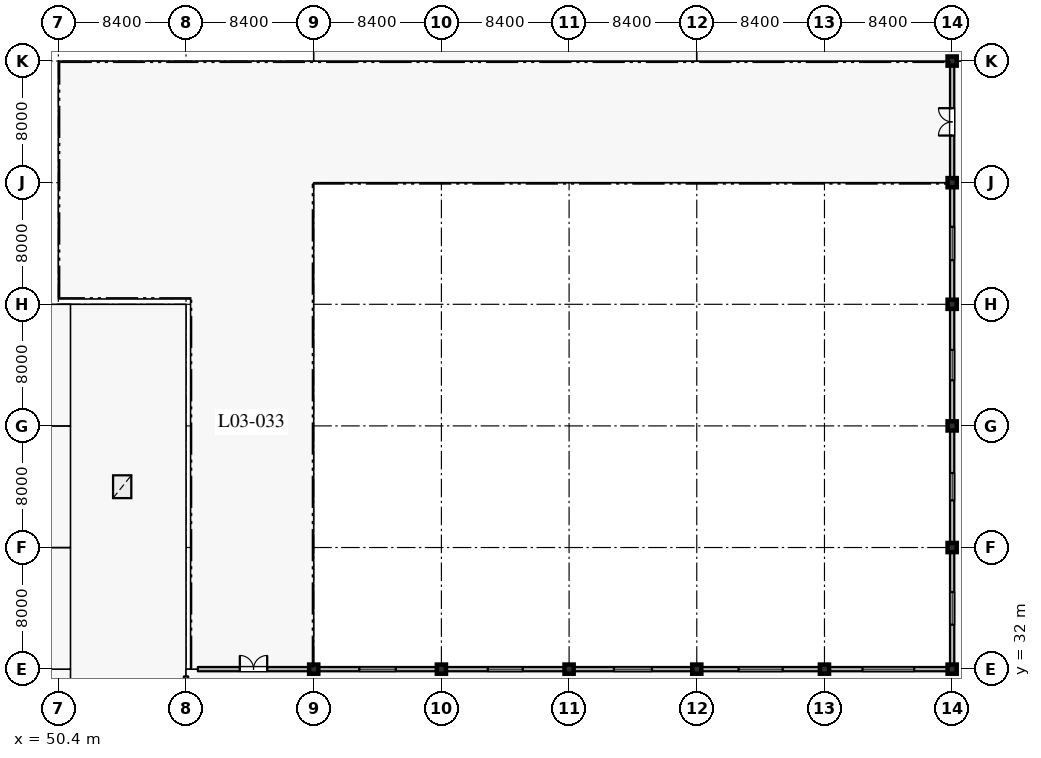
"""IFC4 building model, lengths in metres.
Left out: names, types, materials, properties, quantities, classifications, styles, units other than length and angle.
Written with IfcOpenShell. Run it as: python <this file> out.ifc"""

import sys

from ifc_helpers import new_model, si_unit, direction, frame, frame_2d, origin, origin_2d, place, context, subcontext, project, spatial, rectangle, extrude, element, fill, save


model = new_model("IFC4")
c1 = context("Model", 3, precision=1e-05, world=origin(), true_north=direction((0.0, 1.0)))
c2 = subcontext(c1, "Body", "Model", "MODEL_VIEW")
j1 = project(units=[si_unit("LENGTHUNIT", "METRE"), si_unit("PLANEANGLEUNIT", "RADIAN")], contexts=[c1])
p1 = place(None, origin())
s1 = spatial("IfcSite", under=j1, at=p1, CompositionType="ELEMENT")
p2 = place(p1, origin())
s2 = spatial("IfcBuilding", under=s1, at=p2, CompositionType="ELEMENT")
p3 = place(p2, frame((0.0, 0.0, 16.2)))
s3 = spatial("IfcBuildingStorey", under=s2, at=p3, CompositionType="ELEMENT", Elevation=16.2)
for number, where, z_axis, x_axis in (
    (1, (67.2, 32.0, 0.0), (0.0, 0.0, 1.0), (1.0, 0.0, 0.0)),
    (2, (75.6, 32.0, 0.0), (0.0, 0.0, 1.0), (1.0, 0.0, 0.0)),
    (3, (84.0, 32.0, 0.0), (0.0, 0.0, 1.0), (1.0, 0.0, 0.0)),
    (4, (92.4, 32.0, 0.0), (0.0, 0.0, 1.0), (1.0, 0.0, 0.0)),
    (5, (100.8, 32.0, 0.0), (0.0, 0.0, 1.0), (1.0, 0.0, 0.0)),
    (6, (109.2, 32.0, 0.0), (0.0, 0.0, 1.0), (1.0, 0.0, 0.0)),
    (7, (109.2, 40.0, 0.0), (0.0, 0.0, 1.0), (1.0, 0.0, 0.0)),
    (8, (109.2, 48.0, 0.0), (0.0, 0.0, 1.0), (1.0, 0.0, 0.0)),
    (9, (109.2, 56.0, 0.0), (0.0, 0.0, 1.0), (1.0, 0.0, 0.0)),
    (10, (109.2, 64.0, 0.0), (0.0, 0.0, 1.0), (1.0, 0.0, 0.0)),
    (11, (109.2, 72.0, 0.0), (0.0, 0.0, 1.0), (1.0, 0.0, 0.0)),
):
    element("IfcColumn", number, at=place(p3, frame(where, z_axis=z_axis, x_axis=x_axis)), inside=s3, PredefinedType="COLUMN", context=c2, shape_type="SweptSolid", body=[
        extrude(rectangle(XDim=0.6, YDim=0.6, at=origin_2d()), origin(), (0.0, 0.0, 1.0), 4.8),
    ])
p4 = place(p3, frame((59.58, 32.0, 0.0), z_axis=(0.0, 0.0, 1.0), x_axis=(1.0, 0.0, 0.0)))
e12 = element("IfcWall", 12, at=p4, inside=s3, PredefinedType="SOLIDWALL", context=c2, shape_type="SweptSolid", body=[
    extrude(rectangle(XDim=7.32, YDim=0.28, at=frame_2d((3.66, 0.0))), origin(), (0.0, 0.0, 1.0), 4.5),
])
p5 = place(p4, frame((2.76, 0.0, 0.0)))
e13 = element("IfcOpeningElement", 13, at=p5, cuts=e12, PredefinedType="OPENING", context=c2, shape_type="SweptSolid", body=[
    extrude(rectangle(XDim=1.8, YDim=2.3, at=frame_2d((0.9, 1.15))), frame((0.0, 0.15, 0.0), z_axis=(0.0, -1.0, 0.0), x_axis=(1.0, 0.0, 0.0)), (0.0, 0.0, 1.0), 0.3),
])
p6 = place(p3, frame((67.5, 32.0, 0.0), z_axis=(0.0, 0.0, 1.0), x_axis=(1.0, 0.0, 0.0)))
e14 = element("IfcWall", 14, at=p6, inside=s3, PredefinedType="SOLIDWALL", context=c2, shape_type="SweptSolid", body=[
    extrude(rectangle(XDim=7.8, YDim=0.28, at=frame_2d((3.9, 0.0))), origin(), (0.0, 0.0, 1.0), 3.69),
])
p7 = place(p6, frame((2.7, 0.0, 0.95)))
e15 = element("IfcOpeningElement", 15, at=p7, cuts=e14, PredefinedType="OPENING", context=c2, shape_type="SweptSolid", body=[
    extrude(rectangle(XDim=2.4, YDim=1.2, at=frame_2d((1.2, 0.6))), frame((0.0, 0.15, 0.0), z_axis=(0.0, -1.0, 0.0), x_axis=(1.0, 0.0, 0.0)), (0.0, 0.0, 1.0), 0.3),
])
p8 = place(p3, frame((75.9, 32.0, 0.0), z_axis=(0.0, 0.0, 1.0), x_axis=(1.0, 0.0, 0.0)))
e16 = element("IfcWall", 16, at=p8, inside=s3, PredefinedType="SOLIDWALL", context=c2, shape_type="SweptSolid", body=[
    extrude(rectangle(XDim=7.8, YDim=0.28, at=frame_2d((3.9, 0.0))), origin(), (0.0, 0.0, 1.0), 3.69),
])
p9 = place(p8, frame((2.75, 0.0, 0.95)))
e17 = element("IfcOpeningElement", 17, at=p9, cuts=e16, PredefinedType="OPENING", context=c2, shape_type="SweptSolid", body=[
    extrude(rectangle(XDim=2.3, YDim=1.5, at=frame_2d((1.15, 0.75))), frame((0.0, 0.15, 0.0), z_axis=(0.0, -1.0, 0.0), x_axis=(1.0, 0.0, 0.0)), (0.0, 0.0, 1.0), 0.3),
])
p10 = place(p3, frame((84.3, 32.0, 0.0), z_axis=(0.0, 0.0, 1.0), x_axis=(1.0, 0.0, 0.0)))
e18 = element("IfcWall", 18, at=p10, inside=s3, PredefinedType="SOLIDWALL", context=c2, shape_type="SweptSolid", body=[
    extrude(rectangle(XDim=7.8, YDim=0.28, at=frame_2d((3.9, 0.0))), origin(), (0.0, 0.0, 1.0), 3.69),
])
p11 = place(p10, frame((2.65, 0.0, 0.95)))
e19 = element("IfcOpeningElement", 19, at=p11, cuts=e18, PredefinedType="OPENING", context=c2, shape_type="SweptSolid", body=[
    extrude(rectangle(XDim=2.5, YDim=1.65, at=frame_2d((1.25, 0.825))), frame((0.0, 0.15, 0.0), z_axis=(0.0, -1.0, 0.0), x_axis=(1.0, 0.0, 0.0)), (0.0, 0.0, 1.0), 0.3),
])
p12 = place(p3, frame((92.7, 32.0, 0.0), z_axis=(0.0, 0.0, 1.0), x_axis=(1.0, 0.0, 0.0)))
e20 = element("IfcWall", 20, at=p12, inside=s3, PredefinedType="SOLIDWALL", context=c2, shape_type="SweptSolid", body=[
    extrude(rectangle(XDim=7.8, YDim=0.28, at=frame_2d((3.9, 0.0))), origin(), (0.0, 0.0, 1.0), 3.69),
])
p13 = place(p12, frame((2.45, 0.0, 0.95)))
e21 = element("IfcOpeningElement", 21, at=p13, cuts=e20, PredefinedType="OPENING", context=c2, shape_type="SweptSolid", body=[
    extrude(rectangle(XDim=2.9, YDim=1.75, at=frame_2d((1.45, 0.875))), frame((0.0, 0.15, 0.0), z_axis=(0.0, -1.0, 0.0), x_axis=(1.0, 0.0, 0.0)), (0.0, 0.0, 1.0), 0.3),
])
p14 = place(p3, frame((101.1, 32.0, 0.0), z_axis=(0.0, 0.0, 1.0), x_axis=(1.0, 0.0, 0.0)))
e22 = element("IfcWall", 22, at=p14, inside=s3, PredefinedType="SOLIDWALL", context=c2, shape_type="SweptSolid", body=[
    extrude(rectangle(XDim=7.8, YDim=0.28, at=frame_2d((3.9, 0.0))), origin(), (0.0, 0.0, 1.0), 3.69),
])
p15 = place(p14, frame((2.2, 0.0, 0.95)))
e23 = element("IfcOpeningElement", 23, at=p15, cuts=e22, PredefinedType="OPENING", context=c2, shape_type="SweptSolid", body=[
    extrude(rectangle(XDim=3.4, YDim=1.85, at=frame_2d((1.7, 0.925))), frame((0.0, 0.15, 0.0), z_axis=(0.0, -1.0, 0.0), x_axis=(1.0, 0.0, 0.0)), (0.0, 0.0, 1.0), 0.3),
])
p16 = place(p3, frame((58.8, 24.48, 0.0), z_axis=(0.0, 0.0, 1.0), x_axis=(0.0, 1.0, 0.0)))
e24 = element("IfcWall", 24, at=p16, inside=s3, PredefinedType="SOLIDWALL", context=c2, shape_type="SweptSolid", body=[
    extrude(rectangle(XDim=7.04, YDim=0.28, at=frame_2d((3.52, 0.0))), origin(), (0.0, 0.0, 1.0), 4.5),
])
p17 = place(p16, frame((2.07, 0.0, 0.95)))
e25 = element("IfcOpeningElement", 25, at=p17, cuts=e24, PredefinedType="OPENING", context=c2, shape_type="SweptSolid", body=[
    extrude(rectangle(XDim=2.9, YDim=1.75, at=frame_2d((1.45, 0.875))), frame((0.0, 0.15, 0.0), z_axis=(0.0, -1.0, 0.0), x_axis=(1.0, 0.0, 0.0)), (0.0, 0.0, 1.0), 0.3),
])
p18 = place(p3, frame((109.2, 32.3, 0.0), z_axis=(0.0, 0.0, 1.0), x_axis=(0.0, 1.0, 0.0)))
e26 = element("IfcWall", 26, at=p18, inside=s3, PredefinedType="SOLIDWALL", context=c2, shape_type="SweptSolid", body=[
    extrude(rectangle(XDim=7.4, YDim=0.28, at=frame_2d((3.7, 0.0))), origin(), (0.0, 0.0, 1.0), 3.79),
])
p19 = place(p18, frame((2.625, 0.0, 0.95)))
e27 = element("IfcOpeningElement", 27, at=p19, cuts=e26, PredefinedType="OPENING", context=c2, shape_type="SweptSolid", body=[
    extrude(rectangle(XDim=2.15, YDim=2.1, at=frame_2d((1.075, 1.05))), frame((0.0, 0.15, 0.0), z_axis=(0.0, -1.0, 0.0), x_axis=(1.0, 0.0, 0.0)), (0.0, 0.0, 1.0), 0.3),
])
p20 = place(p3, frame((109.2, 40.3, 0.0), z_axis=(0.0, 0.0, 1.0), x_axis=(0.0, 1.0, 0.0)))
e28 = element("IfcWall", 28, at=p20, inside=s3, PredefinedType="SOLIDWALL", context=c2, shape_type="SweptSolid", body=[
    extrude(rectangle(XDim=7.4, YDim=0.28, at=frame_2d((3.7, 0.0))), origin(), (0.0, 0.0, 1.0), 3.79),
])
p21 = place(p20, frame((2.8, 0.0, 0.95)))
e29 = element("IfcOpeningElement", 29, at=p21, cuts=e28, PredefinedType="OPENING", context=c2, shape_type="SweptSolid", body=[
    extrude(rectangle(XDim=1.8, YDim=1.7, at=frame_2d((0.9, 0.85))), frame((0.0, 0.15, 0.0), z_axis=(0.0, -1.0, 0.0), x_axis=(1.0, 0.0, 0.0)), (0.0, 0.0, 1.0), 0.3),
])
p22 = place(p3, frame((109.2, 48.3, 0.0), z_axis=(0.0, 0.0, 1.0), x_axis=(0.0, 1.0, 0.0)))
e30 = element("IfcWall", 30, at=p22, inside=s3, PredefinedType="SOLIDWALL", context=c2, shape_type="SweptSolid", body=[
    extrude(rectangle(XDim=7.4, YDim=0.28, at=frame_2d((3.7, 0.0))), origin(), (0.0, 0.0, 1.0), 3.79),
])
p23 = place(p22, frame((2.7, 0.0, 0.95)))
e31 = element("IfcOpeningElement", 31, at=p23, cuts=e30, PredefinedType="OPENING", context=c2, shape_type="SweptSolid", body=[
    extrude(rectangle(XDim=2.0, YDim=1.75, at=frame_2d((1.0, 0.875))), frame((0.0, 0.15, 0.0), z_axis=(0.0, -1.0, 0.0), x_axis=(1.0, 0.0, 0.0)), (0.0, 0.0, 1.0), 0.3),
])
p24 = place(p3, frame((109.2, 56.3, 0.0), z_axis=(0.0, 0.0, 1.0), x_axis=(0.0, 1.0, 0.0)))
e32 = element("IfcWall", 32, at=p24, inside=s3, PredefinedType="SOLIDWALL", context=c2, shape_type="SweptSolid", body=[
    extrude(rectangle(XDim=7.4, YDim=0.28, at=frame_2d((3.7, 0.0))), origin(), (0.0, 0.0, 1.0), 4.5),
])
p25 = place(p24, frame((2.6, 0.0, 0.95)))
e33 = element("IfcOpeningElement", 33, at=p25, cuts=e32, PredefinedType="OPENING", context=c2, shape_type="SweptSolid", body=[
    extrude(rectangle(XDim=2.2, YDim=1.75, at=frame_2d((1.1, 0.875))), frame((0.0, 0.15, 0.0), z_axis=(0.0, -1.0, 0.0), x_axis=(1.0, 0.0, 0.0)), (0.0, 0.0, 1.0), 0.3),
])
p26 = place(p3, frame((109.2, 64.3, 0.0), z_axis=(0.0, 0.0, 1.0), x_axis=(0.0, 1.0, 0.0)))
e34 = element("IfcWall", 34, at=p26, inside=s3, PredefinedType="SOLIDWALL", context=c2, shape_type="SweptSolid", body=[
    extrude(rectangle(XDim=7.4, YDim=0.28, at=frame_2d((3.7, 0.0))), origin(), (0.0, 0.0, 1.0), 3.79),
])
p27 = place(p26, frame((2.8, 0.0, 0.0)))
e35 = element("IfcOpeningElement", 35, at=p27, cuts=e34, PredefinedType="OPENING", context=c2, shape_type="SweptSolid", body=[
    extrude(rectangle(XDim=1.8, YDim=2.3, at=frame_2d((0.9, 1.15))), frame((0.0, 0.15, 0.0), z_axis=(0.0, -1.0, 0.0), x_axis=(1.0, 0.0, 0.0)), (0.0, 0.0, 1.0), 0.3),
])
p28 = place(p5, origin())
e36 = element("IfcDoor", 36, at=p28, inside=s3, OperationType="DOUBLE_DOOR_SINGLE_SWING", PredefinedType="DOOR", context=c2, shape_type="SweptSolid", body=[
    extrude(rectangle(XDim=1.8, YDim=2.3, at=frame_2d((0.9, 1.15))), frame((0.0, 0.025, 0.0), z_axis=(0.0, -1.0, 0.0), x_axis=(1.0, 0.0, 0.0)), (0.0, 0.0, 1.0), 0.05),
])
fill(e13, e36)
p29 = place(p7, origin())
e37 = element("IfcWindow", 37, at=p29, inside=s3, PartitioningType="DOUBLE_PANEL_VERTICAL", PredefinedType="WINDOW", context=c2, shape_type="SweptSolid", body=[
    extrude(rectangle(XDim=2.4, YDim=1.2, at=frame_2d((1.2, 0.6))), frame((0.0, 0.03, 0.0), z_axis=(0.0, -1.0, 0.0), x_axis=(1.0, 0.0, 0.0)), (0.0, 0.0, 1.0), 0.06),
])
fill(e15, e37)
p30 = place(p9, origin())
e38 = element("IfcWindow", 38, at=p30, inside=s3, PartitioningType="DOUBLE_PANEL_VERTICAL", PredefinedType="WINDOW", context=c2, shape_type="SweptSolid", body=[
    extrude(rectangle(XDim=2.3, YDim=1.5, at=frame_2d((1.15, 0.75))), frame((0.0, 0.03, 0.0), z_axis=(0.0, -1.0, 0.0), x_axis=(1.0, 0.0, 0.0)), (0.0, 0.0, 1.0), 0.06),
])
fill(e17, e38)
p31 = place(p11, origin())
e39 = element("IfcWindow", 39, at=p31, inside=s3, PartitioningType="DOUBLE_PANEL_VERTICAL", PredefinedType="WINDOW", context=c2, shape_type="SweptSolid", body=[
    extrude(rectangle(XDim=2.5, YDim=1.65, at=frame_2d((1.25, 0.825))), frame((0.0, 0.03, 0.0), z_axis=(0.0, -1.0, 0.0), x_axis=(1.0, 0.0, 0.0)), (0.0, 0.0, 1.0), 0.06),
])
fill(e19, e39)
p32 = place(p13, origin())
e40 = element("IfcWindow", 40, at=p32, inside=s3, PartitioningType="DOUBLE_PANEL_VERTICAL", PredefinedType="WINDOW", context=c2, shape_type="SweptSolid", body=[
    extrude(rectangle(XDim=2.9, YDim=1.75, at=frame_2d((1.45, 0.875))), frame((0.0, 0.03, 0.0), z_axis=(0.0, -1.0, 0.0), x_axis=(1.0, 0.0, 0.0)), (0.0, 0.0, 1.0), 0.06),
])
fill(e21, e40)
p33 = place(p15, origin())
e41 = element("IfcWindow", 41, at=p33, inside=s3, PartitioningType="DOUBLE_PANEL_VERTICAL", PredefinedType="WINDOW", context=c2, shape_type="SweptSolid", body=[
    extrude(rectangle(XDim=3.4, YDim=1.85, at=frame_2d((1.7, 0.925))), frame((0.0, 0.03, 0.0), z_axis=(0.0, -1.0, 0.0), x_axis=(1.0, 0.0, 0.0)), (0.0, 0.0, 1.0), 0.06),
])
fill(e23, e41)
p34 = place(p19, origin())
e42 = element("IfcWindow", 42, at=p34, inside=s3, PartitioningType="DOUBLE_PANEL_VERTICAL", PredefinedType="WINDOW", context=c2, shape_type="SweptSolid", body=[
    extrude(rectangle(XDim=2.15, YDim=2.1, at=frame_2d((1.075, 1.05))), frame((0.0, 0.03, 0.0), z_axis=(0.0, -1.0, 0.0), x_axis=(1.0, 0.0, 0.0)), (0.0, 0.0, 1.0), 0.06),
])
fill(e27, e42)
p35 = place(p21, origin())
e43 = element("IfcWindow", 43, at=p35, inside=s3, PartitioningType="DOUBLE_PANEL_VERTICAL", PredefinedType="WINDOW", context=c2, shape_type="SweptSolid", body=[
    extrude(rectangle(XDim=1.8, YDim=1.7, at=frame_2d((0.9, 0.85))), frame((0.0, 0.03, 0.0), z_axis=(0.0, -1.0, 0.0), x_axis=(1.0, 0.0, 0.0)), (0.0, 0.0, 1.0), 0.06),
])
fill(e29, e43)
p36 = place(p23, origin())
e44 = element("IfcWindow", 44, at=p36, inside=s3, PartitioningType="DOUBLE_PANEL_VERTICAL", PredefinedType="WINDOW", context=c2, shape_type="SweptSolid", body=[
    extrude(rectangle(XDim=2.0, YDim=1.75, at=frame_2d((1.0, 0.875))), frame((0.0, 0.03, 0.0), z_axis=(0.0, -1.0, 0.0), x_axis=(1.0, 0.0, 0.0)), (0.0, 0.0, 1.0), 0.06),
])
fill(e31, e44)
p37 = place(p25, origin())
e45 = element("IfcWindow", 45, at=p37, inside=s3, PartitioningType="DOUBLE_PANEL_VERTICAL", PredefinedType="WINDOW", context=c2, shape_type="SweptSolid", body=[
    extrude(rectangle(XDim=2.2, YDim=1.75, at=frame_2d((1.1, 0.875))), frame((0.0, 0.03, 0.0), z_axis=(0.0, -1.0, 0.0), x_axis=(1.0, 0.0, 0.0)), (0.0, 0.0, 1.0), 0.06),
])
fill(e33, e45)
p38 = place(p27, origin())
e46 = element("IfcDoor", 46, at=p38, inside=s3, OperationType="DOUBLE_DOOR_SINGLE_SWING", PredefinedType="DOOR", context=c2, shape_type="SweptSolid", body=[
    extrude(rectangle(XDim=1.8, YDim=2.3, at=frame_2d((0.9, 1.15))), frame((0.0, 0.025, 0.0), z_axis=(0.0, -1.0, 0.0), x_axis=(1.0, 0.0, 0.0)), (0.0, 0.0, 1.0), 0.05),
])
fill(e35, e46)
p39 = place(p3, frame((0.0, 0.0, -0.26)))
p40 = place(p39, frame((54.6, 44.0, 0.0)))
p41 = place(p40, frame((0.0, 0.0, 0.21)))
e47 = element("IfcWindow", 47, at=p41, inside=s3, PartitioningType="SINGLE_PANEL", PredefinedType="SKYLIGHT", context=c2, shape_type="SweptSolid", body=[
    extrude(rectangle(XDim=1.2, YDim=1.5, at=origin_2d()), origin(), (0.0, 0.0, 1.0), 0.05),
])
save(model, sys.argv[1])
